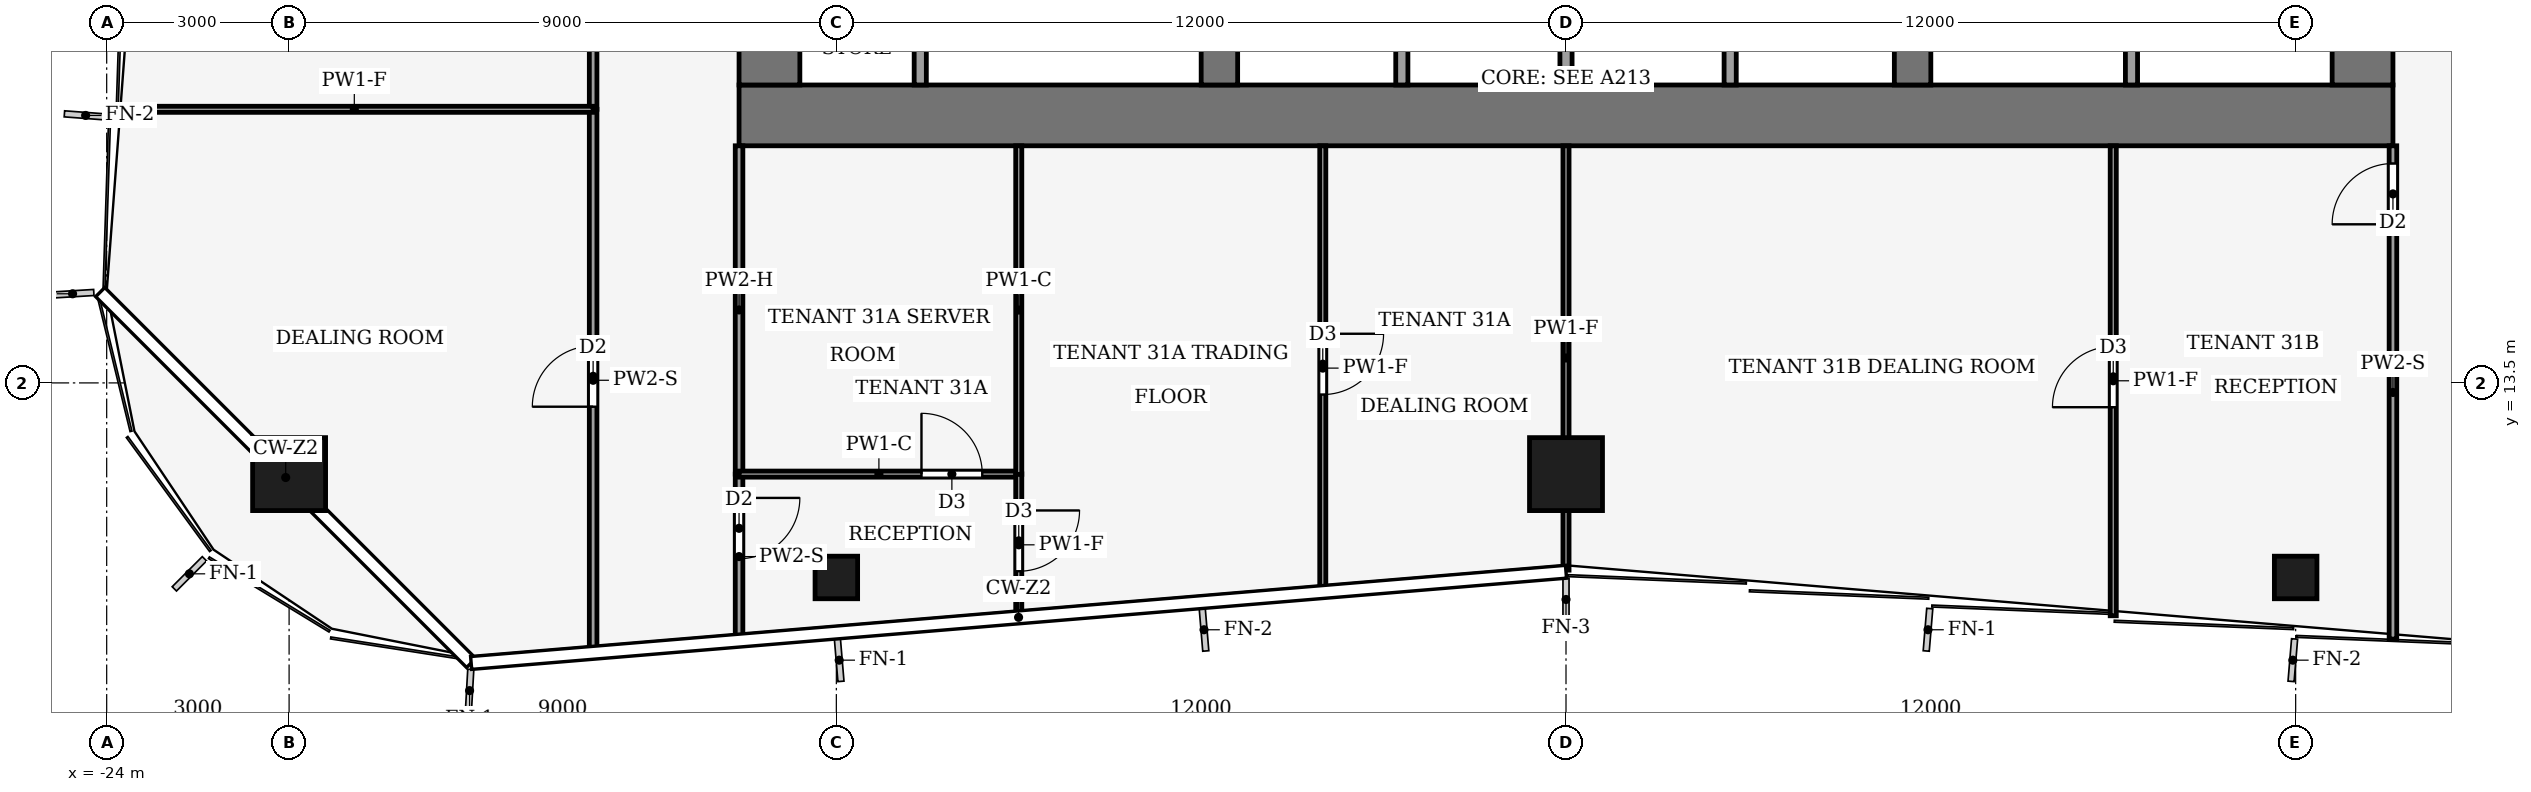
"""IFC4 building model, lengths in metres.
Left out: names, types, materials, properties, quantities, classifications, styles, units other than length and angle.
Written with IfcOpenShell. Run it as: python <this file> out.ifc"""

import sys

from ifc_helpers import new_model, si_unit, direction, frame, frame_2d, origin, origin_2d, place, context, subcontext, project, spatial, rectangle, hollow_rectangle, extrude, element, fill, save


model = new_model("IFC4")
c1 = context("Model", 3, precision=1e-05, world=origin(), true_north=direction((0.0, 1.0)))
c2 = subcontext(c1, "Body", "Model", "MODEL_VIEW")
j1 = project(units=[si_unit("LENGTHUNIT", "METRE"), si_unit("PLANEANGLEUNIT", "RADIAN")], contexts=[c1])
p1 = place(None, origin())
s1 = spatial("IfcSite", under=j1, at=p1, CompositionType="ELEMENT")
p2 = place(p1, origin())
s2 = spatial("IfcBuilding", under=s1, at=p2, CompositionType="ELEMENT")
p3 = place(p2, frame((0.0, 0.0, 138.0)))
s3 = spatial("IfcBuildingStorey", under=s2, at=p3, CompositionType="ELEMENT", Elevation=138.0)
p4 = place(p3, frame((-13.6, 17.9, -0.13), z_axis=(0.0, 0.0, 1.0), x_axis=(1.0, 0.0, 0.0)))
e1 = element("IfcWall", 1, at=p4, inside=s3, PredefinedType="SHEAR", context=c2, shape_type="SweptSolid", body=[
    extrude(rectangle(XDim=27.2, YDim=1.0, at=frame_2d((13.6, 0.0))), origin(), (0.0, 0.0, 1.0), 4.0),
])
p5 = place(p3, frame((-13.1, 18.4, -0.13), z_axis=(0.0, 0.0, 1.0), x_axis=(0.0, 1.0, 0.0)))
e2 = element("IfcWall", 2, at=p5, inside=s3, PredefinedType="SHEAR", context=c2, shape_type="SweptSolid", body=[
    extrude(rectangle(XDim=19.2, YDim=1.0, at=frame_2d((9.6, 0.0))), origin(), (0.0, 0.0, 1.0), 4.0),
])
p6 = place(p5, frame((2.8, 0.0, 0.13)))
e3 = element("IfcOpeningElement", 3, at=p6, cuts=e2, PredefinedType="OPENING", context=c2, shape_type="SweptSolid", body=[
    extrude(rectangle(XDim=2.4, YDim=2.4, at=frame_2d((1.2, 1.2))), frame((0.0, 0.51, 0.0), z_axis=(0.0, -1.0, 0.0), x_axis=(1.0, 0.0, 0.0)), (0.0, 0.0, 1.0), 1.02),
])
p7 = place(p5, frame((13.4, 0.0, 0.13)))
e4 = element("IfcOpeningElement", 4, at=p7, cuts=e2, PredefinedType="OPENING", context=c2, shape_type="SweptSolid", body=[
    extrude(rectangle(XDim=1.4, YDim=2.2, at=frame_2d((0.7, 1.1))), frame((0.0, 0.51, 0.0), z_axis=(0.0, -1.0, 0.0), x_axis=(1.0, 0.0, 0.0)), (0.0, 0.0, 1.0), 1.02),
])
p8 = place(p3, frame((13.1, 18.4, -0.13), z_axis=(0.0, 0.0, 1.0), x_axis=(0.0, 1.0, 0.0)))
e5 = element("IfcWall", 5, at=p8, inside=s3, PredefinedType="SHEAR", context=c2, shape_type="SweptSolid", body=[
    extrude(rectangle(XDim=19.2, YDim=1.0, at=frame_2d((9.6, 0.0))), origin(), (0.0, 0.0, 1.0), 4.0),
])
p9 = place(p8, frame((2.8, 0.0, 0.13)))
e6 = element("IfcOpeningElement", 6, at=p9, cuts=e5, PredefinedType="OPENING", context=c2, shape_type="SweptSolid", body=[
    extrude(rectangle(XDim=2.4, YDim=2.4, at=frame_2d((1.2, 1.2))), frame((0.0, 0.51, 0.0), z_axis=(0.0, -1.0, 0.0), x_axis=(1.0, 0.0, 0.0)), (0.0, 0.0, 1.0), 1.02),
])
p10 = place(p8, frame((13.3, 0.0, 0.13)))
e7 = element("IfcOpeningElement", 7, at=p10, cuts=e5, PredefinedType="OPENING", context=c2, shape_type="SweptSolid", body=[
    extrude(rectangle(XDim=2.4, YDim=2.4, at=frame_2d((1.2, 1.2))), frame((0.0, 0.51, 0.0), z_axis=(0.0, -1.0, 0.0), x_axis=(1.0, 0.0, 0.0)), (0.0, 0.0, 1.0), 1.02),
])
p11 = place(p3, frame((-5.7, 18.4, -0.13), z_axis=(0.0, 0.0, 1.0), x_axis=(0.0, 1.0, 0.0)))
e8 = element("IfcWall", 8, at=p11, inside=s3, PredefinedType="SHEAR", context=c2, shape_type="SweptSolid", body=[
    extrude(rectangle(XDim=19.2, YDim=0.6, at=frame_2d((9.6, 0.0))), origin(), (0.0, 0.0, 1.0), 4.0),
])
p12 = place(p11, frame((8.35, 0.0, 0.13)))
e9 = element("IfcOpeningElement", 9, at=p12, cuts=e8, PredefinedType="OPENING", context=c2, shape_type="SweptSolid", body=[
    extrude(rectangle(XDim=0.9, YDim=2.1, at=frame_2d((0.45, 1.05))), frame((0.0, 0.31, 0.0), z_axis=(0.0, -1.0, 0.0), x_axis=(1.0, 0.0, 0.0)), (0.0, 0.0, 1.0), 0.62),
])
p13 = place(p3, frame((5.7, 18.4, -0.13), z_axis=(0.0, 0.0, 1.0), x_axis=(0.0, 1.0, 0.0)))
e10 = element("IfcWall", 10, at=p13, inside=s3, PredefinedType="SHEAR", context=c2, shape_type="SweptSolid", body=[
    extrude(rectangle(XDim=19.2, YDim=0.6, at=frame_2d((9.6, 0.0))), origin(), (0.0, 0.0, 1.0), 4.0),
])
p14 = place(p13, frame((13.3, 0.0, 0.13)))
e11 = element("IfcOpeningElement", 11, at=p14, cuts=e10, PredefinedType="OPENING", context=c2, shape_type="SweptSolid", body=[
    extrude(rectangle(XDim=2.4, YDim=2.4, at=frame_2d((1.2, 1.2))), frame((0.0, 0.31, 0.0), z_axis=(0.0, -1.0, 0.0), x_axis=(1.0, 0.0, 0.0)), (0.0, 0.0, 1.0), 0.62),
])
for number, where, z_axis, x_axis in (
    (12, (0.0, 12.0, 0.0), (0.0, 0.0, 1.0), (1.0, 0.0, 0.0)),
    (13, (-21.0, 12.0, 0.0), (0.0, 0.0, 1.0), (1.0, 0.0, 0.0)),
):
    element("IfcColumn", number, at=place(p3, frame(where, z_axis=z_axis, x_axis=x_axis)), inside=s3, PredefinedType="COLUMN", context=c2, shape_type="SweptSolid", body=[
        extrude(hollow_rectangle(XDim=1.2, YDim=1.2, WallThickness=0.07, at=origin_2d()), origin(), (0.0, 0.0, 1.0), 4.0),
    ])
for number, where, z_axis, x_axis in (
    (14, (-12.0, 10.3, 0.0), (0.0, 0.0, 1.0), (1.0, 0.0, 0.0)),
    (15, (12.0, 10.3, 0.0), (0.0, 0.0, 1.0), (1.0, 0.0, 0.0)),
):
    element("IfcColumn", number, at=place(p3, frame(where, z_axis=z_axis, x_axis=x_axis)), inside=s3, PredefinedType="COLUMN", context=c2, shape_type="SweptSolid", body=[
        extrude(hollow_rectangle(XDim=0.7, YDim=0.7, WallThickness=0.03, at=origin_2d()), origin(), (0.0, 0.0, 1.0), 4.0),
    ])
for number, where, z_axis, x_axis in (
    (16, (-10.62, 18.4, 0.0), (0.0, 0.0, 1.0), (0.0, 1.0, 0.0)),
    (17, (-2.7, 18.4, 0.0), (0.0, 0.0, 1.0), (0.0, 1.0, 0.0)),
    (18, (0.0, 18.4, 0.0), (0.0, 0.0, 1.0), (0.0, 1.0, 0.0)),
    (19, (2.7, 18.4, 0.0), (0.0, 0.0, 1.0), (0.0, 1.0, 0.0)),
    (20, (9.3, 18.4, 0.0), (0.0, 0.0, 1.0), (0.0, 1.0, 0.0)),
):
    element("IfcWall", number, at=place(p3, frame(where, z_axis=z_axis, x_axis=x_axis)), inside=s3, PredefinedType="PARTITIONING", context=c2, shape_type="SweptSolid", body=[
        extrude(rectangle(XDim=2.4, YDim=0.2, at=frame_2d((1.2, 0.0))), origin(), (0.0, 0.0, 1.0), 3.87),
    ])
p15 = place(p3, frame((-16.0, 9.087, 0.0), z_axis=(0.0, 0.0, 1.0), x_axis=(0.0, 1.0, 0.0)))
e21 = element("IfcWall", 21, at=p15, inside=s3, PredefinedType="PARTITIONING", context=c2, shape_type="SweptSolid", body=[
    extrude(rectangle(XDim=8.913, YDim=0.125, at=frame_2d((4.457, 0.0))), origin(), (0.0, 0.0, 1.0), 3.04),
])
p16 = place(p15, frame((4.022, 0.0, 0.0)))
e22 = element("IfcOpeningElement", 22, at=p16, cuts=e21, PredefinedType="OPENING", context=c2, shape_type="SweptSolid", body=[
    extrude(rectangle(XDim=1.0, YDim=2.1, at=frame_2d((0.5, 1.05))), frame((0.0, 0.073, 0.0), z_axis=(0.0, -1.0, 0.0), x_axis=(1.0, 0.0, 0.0)), (0.0, 0.0, 1.0), 0.145),
])
p17 = place(p3, frame((-16.0, 33.0, 0.0), z_axis=(0.0, 0.0, 1.0), x_axis=(0.0, -1.0, 0.0)))
e23 = element("IfcWall", 23, at=p17, inside=s3, PredefinedType="PARTITIONING", context=c2, shape_type="SweptSolid", body=[
    extrude(rectangle(XDim=15.0, YDim=0.125, at=frame_2d((7.5, 0.0))), origin(), (0.0, 0.0, 1.0), 3.48),
])
p18 = place(p17, frame((6.6, 0.0, 0.0)))
e24 = element("IfcOpeningElement", 24, at=p18, cuts=e23, PredefinedType="OPENING", context=c2, shape_type="SweptSolid", body=[
    extrude(rectangle(XDim=1.8, YDim=2.1, at=frame_2d((0.9, 1.05))), frame((0.0, 0.073, 0.0), z_axis=(0.0, -1.0, 0.0), x_axis=(1.0, 0.0, 0.0)), (0.0, 0.0, 1.0), 0.145),
])
p19 = place(p3, frame((-13.6, 12.0, 0.0), z_axis=(0.0, 0.0, 1.0), x_axis=(0.0, -1.0, 0.0)))
e25 = element("IfcWall", 25, at=p19, inside=s3, PredefinedType="PARTITIONING", context=c2, shape_type="SweptSolid", body=[
    extrude(rectangle(XDim=2.713, YDim=0.125, at=frame_2d((1.357, 0.0))), origin(), (0.0, 0.0, 1.0), 3.04),
])
p20 = place(p19, frame((0.392, 0.0, 0.0)))
e26 = element("IfcOpeningElement", 26, at=p20, cuts=e25, PredefinedType="OPENING", context=c2, shape_type="SweptSolid", body=[
    extrude(rectangle(XDim=1.0, YDim=2.1, at=frame_2d((0.5, 1.05))), frame((0.0, 0.073, 0.0), z_axis=(0.0, -1.0, 0.0), x_axis=(1.0, 0.0, 0.0)), (0.0, 0.0, 1.0), 0.145),
])
p21 = place(p3, frame((-13.6, 12.0, 0.0), z_axis=(0.0, 0.0, 1.0), x_axis=(0.0, 1.0, 0.0)))
e27 = element("IfcWall", 27, at=p21, inside=s3, PredefinedType="PARTITIONING", context=c2, shape_type="SweptSolid", body=[
    extrude(rectangle(XDim=5.4, YDim=0.125, at=frame_2d((2.7, 0.0))), origin(), (0.0, 0.0, 1.0), 3.14),
])
p22 = place(p3, frame((13.6, 9.287, 0.0), z_axis=(0.0, 0.0, 1.0), x_axis=(0.0, 1.0, 0.0)))
e28 = element("IfcWall", 28, at=p22, inside=s3, PredefinedType="PARTITIONING", context=c2, shape_type="SweptSolid", body=[
    extrude(rectangle(XDim=8.113, YDim=0.125, at=frame_2d((4.057, 0.0))), origin(), (0.0, 0.0, 1.0), 3.04),
])
p23 = place(p22, frame((6.822, 0.0, 0.0)))
e29 = element("IfcOpeningElement", 29, at=p23, cuts=e28, PredefinedType="OPENING", context=c2, shape_type="SweptSolid", body=[
    extrude(rectangle(XDim=1.0, YDim=2.1, at=frame_2d((0.5, 1.05))), frame((0.0, 0.073, 0.0), z_axis=(0.0, -1.0, 0.0), x_axis=(1.0, 0.0, 0.0)), (0.0, 0.0, 1.0), 0.145),
])
p24 = place(p3, frame((-16.0, 18.0, 0.0), z_axis=(0.0, 0.0, 1.0), x_axis=(-1.0, 0.0, 0.0)))
e30 = element("IfcWall", 30, at=p24, inside=s3, PredefinedType="PARTITIONING", context=c2, shape_type="SweptSolid", body=[
    extrude(rectangle(XDim=7.855, YDim=0.1, at=frame_2d((3.927, 0.0))), origin(), (0.0, 0.0, 1.0), 3.04),
])
p25 = place(p3, frame((-13.6, 12.0, 0.0), z_axis=(0.0, 0.0, 1.0), x_axis=(1.0, 0.0, 0.0)))
e31 = element("IfcWall", 31, at=p25, inside=s3, PredefinedType="PARTITIONING", context=c2, shape_type="SweptSolid", body=[
    extrude(rectangle(XDim=4.6, YDim=0.1, at=frame_2d((2.3, 0.0))), origin(), (0.0, 0.0, 1.0), 3.87),
])
p26 = place(p25, frame((3.0, 0.0, 0.0)))
e32 = element("IfcOpeningElement", 32, at=p26, cuts=e31, PredefinedType="OPENING", context=c2, shape_type="SweptSolid", body=[
    extrude(rectangle(XDim=1.0, YDim=2.1, at=frame_2d((0.5, 1.05))), frame((0.0, 0.06, 0.0), z_axis=(0.0, -1.0, 0.0), x_axis=(1.0, 0.0, 0.0)), (0.0, 0.0, 1.0), 0.12),
])
p27 = place(p3, frame((-9.0, 12.004, 0.0), z_axis=(0.0, 0.0, 1.0), x_axis=(0.0, -1.0, 0.0)))
e33 = element("IfcWall", 33, at=p27, inside=s3, PredefinedType="PARTITIONING", context=c2, shape_type="SweptSolid", body=[
    extrude(rectangle(XDim=2.334, YDim=0.1, at=frame_2d((1.167, 0.0))), origin(), (0.0, 0.0, 1.0), 3.04),
])
p28 = place(p27, frame((0.602, 0.0, 0.0)))
e34 = element("IfcOpeningElement", 34, at=p28, cuts=e33, PredefinedType="OPENING", context=c2, shape_type="SweptSolid", body=[
    extrude(rectangle(XDim=1.0, YDim=2.1, at=frame_2d((0.5, 1.05))), frame((0.0, 0.06, 0.0), z_axis=(0.0, -1.0, 0.0), x_axis=(1.0, 0.0, 0.0)), (0.0, 0.0, 1.0), 0.12),
])
p29 = place(p3, frame((-9.0, 11.996, 0.0), z_axis=(0.0, 0.0, 1.0), x_axis=(0.0, 1.0, 0.0)))
e35 = element("IfcWall", 35, at=p29, inside=s3, PredefinedType="PARTITIONING", context=c2, shape_type="SweptSolid", body=[
    extrude(rectangle(XDim=5.404, YDim=0.1, at=frame_2d((2.702, 0.0))), origin(), (0.0, 0.0, 1.0), 3.87),
])
p30 = place(p3, frame((-4.0, 17.4, 0.0), z_axis=(0.0, 0.0, 1.0), x_axis=(0.0, -1.0, 0.0)))
e36 = element("IfcWall", 36, at=p30, inside=s3, PredefinedType="PARTITIONING", context=c2, shape_type="SweptSolid", body=[
    extrude(rectangle(XDim=7.313, YDim=0.1, at=frame_2d((3.657, 0.0))), origin(), (0.0, 0.0, 1.0), 3.04),
])
p31 = place(p30, frame((3.092, 0.0, 0.0)))
e37 = element("IfcOpeningElement", 37, at=p31, cuts=e36, PredefinedType="OPENING", context=c2, shape_type="SweptSolid", body=[
    extrude(rectangle(XDim=1.0, YDim=2.1, at=frame_2d((0.5, 1.05))), frame((0.0, 0.06, 0.0), z_axis=(0.0, -1.0, 0.0), x_axis=(1.0, 0.0, 0.0)), (0.0, 0.0, 1.0), 0.12),
])
p32 = place(p3, frame((0.0, 10.42, 0.0), z_axis=(0.0, 0.0, 1.0), x_axis=(0.0, 1.0, 0.0)))
e38 = element("IfcWall", 38, at=p32, inside=s3, PredefinedType="PARTITIONING", context=c2, shape_type="SweptSolid", body=[
    extrude(rectangle(XDim=6.98, YDim=0.1, at=frame_2d((3.49, 0.0))), origin(), (0.0, 0.0, 1.0), 3.04),
])
p33 = place(p3, frame((9.0, 9.67, 0.0), z_axis=(0.0, 0.0, 1.0), x_axis=(0.0, 1.0, 0.0)))
e39 = element("IfcWall", 39, at=p33, inside=s3, PredefinedType="PARTITIONING", context=c2, shape_type="SweptSolid", body=[
    extrude(rectangle(XDim=7.73, YDim=0.1, at=frame_2d((3.865, 0.0))), origin(), (0.0, 0.0, 1.0), 3.04),
])
p34 = place(p33, frame((3.43, 0.0, 0.0)))
e40 = element("IfcOpeningElement", 40, at=p34, cuts=e39, PredefinedType="OPENING", context=c2, shape_type="SweptSolid", body=[
    extrude(rectangle(XDim=1.0, YDim=2.1, at=frame_2d((0.5, 1.05))), frame((0.0, 0.06, 0.0), z_axis=(0.0, -1.0, 0.0), x_axis=(1.0, 0.0, 0.0)), (0.0, 0.0, 1.0), 0.12),
])
p35 = place(p16, origin())
e41 = element("IfcDoor", 41, at=p35, inside=s3, OperationType="SINGLE_SWING_RIGHT", PredefinedType="DOOR", context=c2, shape_type="SweptSolid", body=[
    extrude(rectangle(XDim=1.0, YDim=2.1, at=frame_2d((0.5, 1.05))), frame((0.0, 0.025, 0.0), z_axis=(0.0, -1.0, 0.0), x_axis=(1.0, 0.0, 0.0)), (0.0, 0.0, 1.0), 0.05),
])
fill(e22, e41)
p36 = place(p20, origin())
e42 = element("IfcDoor", 42, at=p36, inside=s3, OperationType="SINGLE_SWING_LEFT", PredefinedType="DOOR", context=c2, shape_type="SweptSolid", body=[
    extrude(rectangle(XDim=1.0, YDim=2.1, at=frame_2d((0.5, 1.05))), frame((0.0, 0.025, 0.0), z_axis=(0.0, -1.0, 0.0), x_axis=(1.0, 0.0, 0.0)), (0.0, 0.0, 1.0), 0.05),
])
fill(e26, e42)
p37 = place(p23, origin())
e43 = element("IfcDoor", 43, at=p37, inside=s3, OperationType="SINGLE_SWING_RIGHT", PredefinedType="DOOR", context=c2, shape_type="SweptSolid", body=[
    extrude(rectangle(XDim=1.0, YDim=2.1, at=frame_2d((0.5, 1.05))), frame((0.0, 0.025, 0.0), z_axis=(0.0, -1.0, 0.0), x_axis=(1.0, 0.0, 0.0)), (0.0, 0.0, 1.0), 0.05),
])
fill(e29, e43)
p38 = place(p26, origin())
e44 = element("IfcDoor", 44, at=p38, inside=s3, OperationType="SINGLE_SWING_RIGHT", PredefinedType="DOOR", context=c2, shape_type="SweptSolid", body=[
    extrude(rectangle(XDim=1.0, YDim=2.1, at=frame_2d((0.5, 1.05))), frame((0.0, 0.025, 0.0), z_axis=(0.0, -1.0, 0.0), x_axis=(1.0, 0.0, 0.0)), (0.0, 0.0, 1.0), 0.05),
])
fill(e32, e44)
p39 = place(p28, origin())
e45 = element("IfcDoor", 45, at=p39, inside=s3, OperationType="SINGLE_SWING_LEFT", PredefinedType="DOOR", context=c2, shape_type="SweptSolid", body=[
    extrude(rectangle(XDim=1.0, YDim=2.1, at=frame_2d((0.5, 1.05))), frame((0.0, 0.025, 0.0), z_axis=(0.0, -1.0, 0.0), x_axis=(1.0, 0.0, 0.0)), (0.0, 0.0, 1.0), 0.05),
])
fill(e34, e45)
p40 = place(p31, origin())
e46 = element("IfcDoor", 46, at=p40, inside=s3, OperationType="SINGLE_SWING_LEFT", PredefinedType="DOOR", context=c2, shape_type="SweptSolid", body=[
    extrude(rectangle(XDim=1.0, YDim=2.1, at=frame_2d((0.5, 1.05))), frame((0.0, 0.025, 0.0), z_axis=(0.0, -1.0, 0.0), x_axis=(1.0, 0.0, 0.0)), (0.0, 0.0, 1.0), 0.05),
])
fill(e37, e46)
p41 = place(p34, origin())
e47 = element("IfcDoor", 47, at=p41, inside=s3, OperationType="SINGLE_SWING_RIGHT", PredefinedType="DOOR", context=c2, shape_type="SweptSolid", body=[
    extrude(rectangle(XDim=1.0, YDim=2.1, at=frame_2d((0.5, 1.05))), frame((0.0, 0.025, 0.0), z_axis=(0.0, -1.0, 0.0), x_axis=(1.0, 0.0, 0.0)), (0.0, 0.0, 1.0), 0.05),
])
fill(e40, e47)
save(model, sys.argv[1])
